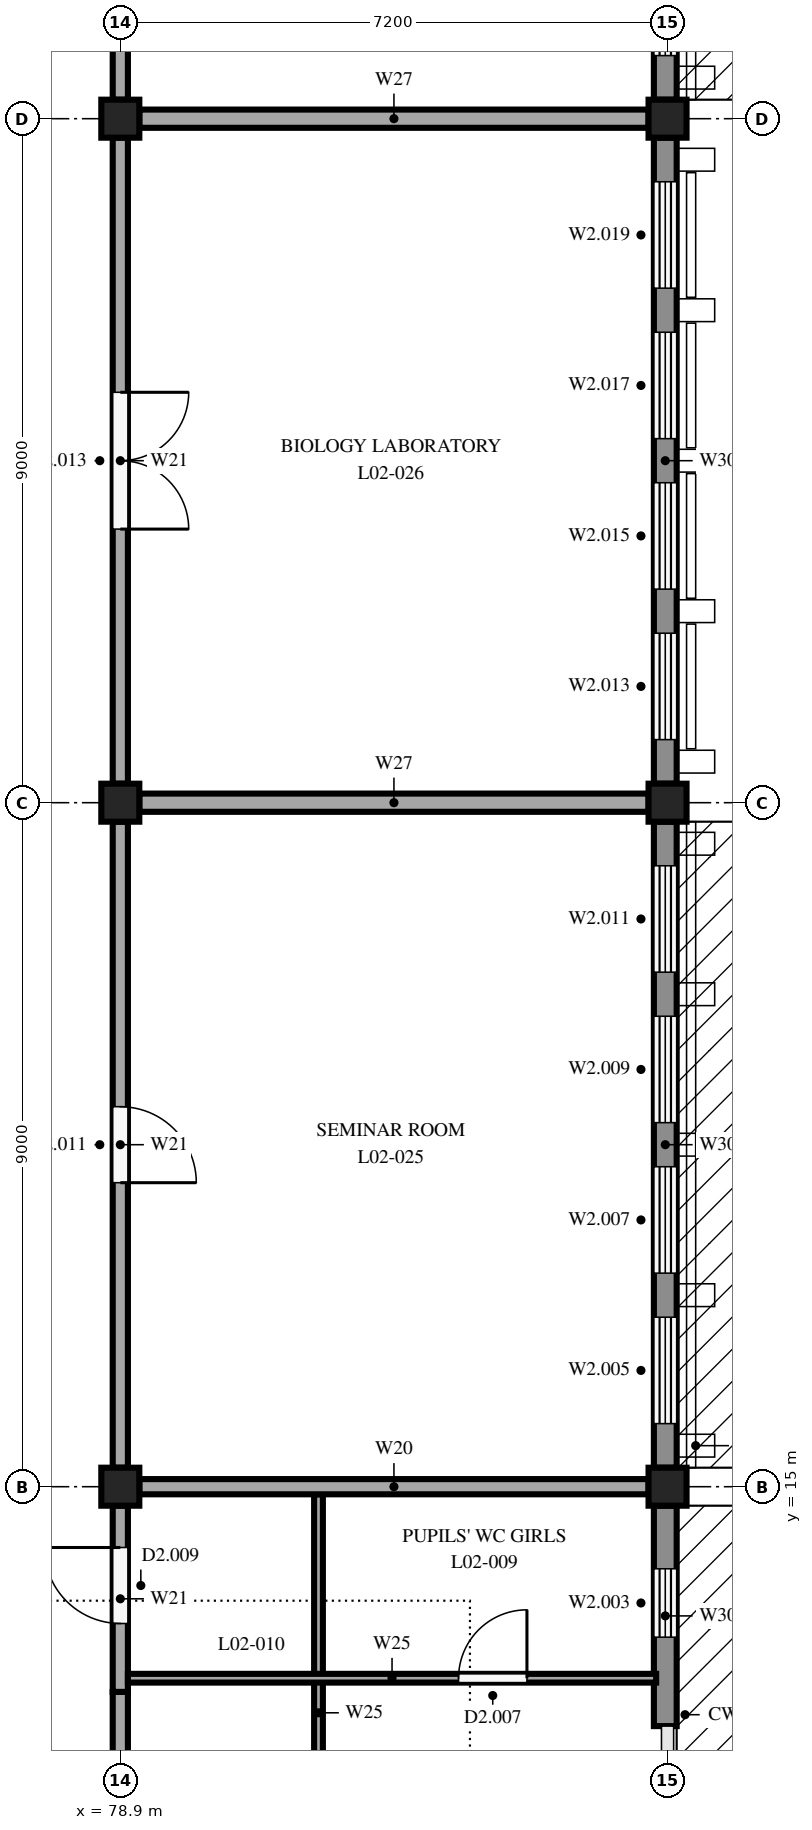
"""IFC4 building model, lengths in metres.
Left out: names, types, materials, properties, quantities, classifications, styles, units other than length and angle.
Written with IfcOpenShell. Run it as: python <this file> out.ifc"""

import sys

from ifc_helpers import new_model, si_unit, direction, frame, frame_2d, origin, origin_2d, place, context, subcontext, project, spatial, rectangle, extrude, element, fill, save


model = new_model("IFC4")
c1 = context("Model", 3, precision=1e-05, world=origin(), true_north=direction((0.0, 1.0)))
c2 = subcontext(c1, "Body", "Model", "MODEL_VIEW")
j1 = project(units=[si_unit("LENGTHUNIT", "METRE"), si_unit("PLANEANGLEUNIT", "RADIAN")], contexts=[c1])
p1 = place(None, origin())
s1 = spatial("IfcSite", under=j1, at=p1, CompositionType="ELEMENT")
p2 = place(p1, origin())
s2 = spatial("IfcBuilding", under=s1, at=p2, CompositionType="ELEMENT")
p3 = place(p2, frame((0.0, 0.0, 8.1)))
s3 = spatial("IfcBuildingStorey", under=s2, at=p3, CompositionType="ELEMENT", Elevation=8.1)
for number, where, z_axis, x_axis in (
    (1, (78.9, 15.0, 0.0), (0.0, 0.0, 1.0), (1.0, 0.0, 0.0)),
    (2, (78.9, 24.0, 0.0), (0.0, 0.0, 1.0), (1.0, 0.0, 0.0)),
    (3, (78.9, 33.0, 0.0), (0.0, 0.0, 1.0), (1.0, 0.0, 0.0)),
    (4, (86.1, 15.0, 0.0), (0.0, 0.0, 1.0), (1.0, 0.0, 0.0)),
    (5, (86.1, 24.0, 0.0), (0.0, 0.0, 1.0), (1.0, 0.0, 0.0)),
    (6, (86.1, 33.0, 0.0), (0.0, 0.0, 1.0), (1.0, 0.0, 0.0)),
):
    element("IfcColumn", number, at=place(p3, frame(where, z_axis=z_axis, x_axis=x_axis)), inside=s3, PredefinedType="COLUMN", context=c2, shape_type="SweptSolid", body=[
        extrude(rectangle(XDim=0.5, YDim=0.5, at=origin_2d()), origin(), (0.0, 0.0, 1.0), 3.35),
    ])
p4 = place(p3, frame((86.07, 14.75, 0.0), z_axis=(0.0, 0.0, 1.0), x_axis=(0.0, -1.0, 0.0)))
e7 = element("IfcWall", 7, at=p4, inside=s3, PredefinedType="STANDARD", context=c2, shape_type="SweptSolid", body=[
    extrude(rectangle(XDim=2.9, YDim=0.3, at=frame_2d((1.45, 0.0))), origin(), (0.0, 0.0, 1.0), 2.85),
])
p5 = place(p4, frame((0.83, 0.0, 1.6)))
e8 = element("IfcOpeningElement", 8, at=p5, cuts=e7, PredefinedType="OPENING", context=c2, shape_type="SweptSolid", body=[
    extrude(rectangle(XDim=0.9, YDim=1.0, at=frame_2d((0.45, 0.5))), frame((0.0, 0.16, 0.0), z_axis=(0.0, -1.0, 0.0), x_axis=(1.0, 0.0, 0.0)), (0.0, 0.0, 1.0), 0.32),
])
p6 = place(p3, frame((86.07, 23.75, 0.0), z_axis=(0.0, 0.0, 1.0), x_axis=(0.0, -1.0, 0.0)))
e9 = element("IfcWall", 9, at=p6, inside=s3, PredefinedType="STANDARD", context=c2, shape_type="SweptSolid", body=[
    extrude(rectangle(XDim=8.5, YDim=0.3, at=frame_2d((4.25, 0.0))), origin(), (0.0, 0.0, 1.0), 2.85),
])
p7 = place(p6, frame((6.52, 0.0, 0.6)))
e10 = element("IfcOpeningElement", 10, at=p7, cuts=e9, PredefinedType="OPENING", context=c2, shape_type="SweptSolid", body=[
    extrude(rectangle(XDim=1.4, YDim=2.2, at=frame_2d((0.7, 1.1))), frame((0.0, 0.16, 0.0), z_axis=(0.0, -1.0, 0.0), x_axis=(1.0, 0.0, 0.0)), (0.0, 0.0, 1.0), 0.32),
])
p8 = place(p6, frame((4.54, 0.0, 0.6)))
e11 = element("IfcOpeningElement", 11, at=p8, cuts=e9, PredefinedType="OPENING", context=c2, shape_type="SweptSolid", body=[
    extrude(rectangle(XDim=1.4, YDim=2.2, at=frame_2d((0.7, 1.1))), frame((0.0, 0.16, 0.0), z_axis=(0.0, -1.0, 0.0), x_axis=(1.0, 0.0, 0.0)), (0.0, 0.0, 1.0), 0.32),
])
p9 = place(p6, frame((2.56, 0.0, 0.6)))
e12 = element("IfcOpeningElement", 12, at=p9, cuts=e9, PredefinedType="OPENING", context=c2, shape_type="SweptSolid", body=[
    extrude(rectangle(XDim=1.4, YDim=2.2, at=frame_2d((0.7, 1.1))), frame((0.0, 0.16, 0.0), z_axis=(0.0, -1.0, 0.0), x_axis=(1.0, 0.0, 0.0)), (0.0, 0.0, 1.0), 0.32),
])
p10 = place(p6, frame((0.58, 0.0, 0.6)))
e13 = element("IfcOpeningElement", 13, at=p10, cuts=e9, PredefinedType="OPENING", context=c2, shape_type="SweptSolid", body=[
    extrude(rectangle(XDim=1.4, YDim=2.2, at=frame_2d((0.7, 1.1))), frame((0.0, 0.16, 0.0), z_axis=(0.0, -1.0, 0.0), x_axis=(1.0, 0.0, 0.0)), (0.0, 0.0, 1.0), 0.32),
])
p11 = place(p3, frame((86.07, 32.75, 0.0), z_axis=(0.0, 0.0, 1.0), x_axis=(0.0, -1.0, 0.0)))
e14 = element("IfcWall", 14, at=p11, inside=s3, PredefinedType="STANDARD", context=c2, shape_type="SweptSolid", body=[
    extrude(rectangle(XDim=8.5, YDim=0.3, at=frame_2d((4.25, 0.0))), origin(), (0.0, 0.0, 1.0), 2.85),
])
p12 = place(p11, frame((6.52, 0.0, 0.9)))
e15 = element("IfcOpeningElement", 15, at=p12, cuts=e14, PredefinedType="OPENING", context=c2, shape_type="SweptSolid", body=[
    extrude(rectangle(XDim=1.4, YDim=1.9, at=frame_2d((0.7, 0.95))), frame((0.0, 0.16, 0.0), z_axis=(0.0, -1.0, 0.0), x_axis=(1.0, 0.0, 0.0)), (0.0, 0.0, 1.0), 0.32),
])
p13 = place(p11, frame((4.54, 0.0, 0.9)))
e16 = element("IfcOpeningElement", 16, at=p13, cuts=e14, PredefinedType="OPENING", context=c2, shape_type="SweptSolid", body=[
    extrude(rectangle(XDim=1.4, YDim=1.9, at=frame_2d((0.7, 0.95))), frame((0.0, 0.16, 0.0), z_axis=(0.0, -1.0, 0.0), x_axis=(1.0, 0.0, 0.0)), (0.0, 0.0, 1.0), 0.32),
])
p14 = place(p11, frame((2.56, 0.0, 0.9)))
e17 = element("IfcOpeningElement", 17, at=p14, cuts=e14, PredefinedType="OPENING", context=c2, shape_type="SweptSolid", body=[
    extrude(rectangle(XDim=1.4, YDim=1.9, at=frame_2d((0.7, 0.95))), frame((0.0, 0.16, 0.0), z_axis=(0.0, -1.0, 0.0), x_axis=(1.0, 0.0, 0.0)), (0.0, 0.0, 1.0), 0.32),
])
p15 = place(p11, frame((0.58, 0.0, 0.9)))
e18 = element("IfcOpeningElement", 18, at=p15, cuts=e14, PredefinedType="OPENING", context=c2, shape_type="SweptSolid", body=[
    extrude(rectangle(XDim=1.4, YDim=1.9, at=frame_2d((0.7, 0.95))), frame((0.0, 0.16, 0.0), z_axis=(0.0, -1.0, 0.0), x_axis=(1.0, 0.0, 0.0)), (0.0, 0.0, 1.0), 0.32),
])
p16 = place(p3, frame((86.07, 41.75, 0.0), z_axis=(0.0, 0.0, 1.0), x_axis=(0.0, -1.0, 0.0)))
e19 = element("IfcWall", 19, at=p16, inside=s3, PredefinedType="STANDARD", context=c2, shape_type="SweptSolid", body=[
    extrude(rectangle(XDim=8.5, YDim=0.3, at=frame_2d((4.25, 0.0))), origin(), (0.0, 0.0, 1.0), 2.85),
])
p17 = place(p16, frame((6.52, 0.0, 0.9)))
e20 = element("IfcOpeningElement", 20, at=p17, cuts=e19, PredefinedType="OPENING", context=c2, shape_type="SweptSolid", body=[
    extrude(rectangle(XDim=1.4, YDim=1.9, at=frame_2d((0.7, 0.95))), frame((0.0, 0.16, 0.0), z_axis=(0.0, -1.0, 0.0), x_axis=(1.0, 0.0, 0.0)), (0.0, 0.0, 1.0), 0.32),
])
p18 = place(p16, frame((4.54, 0.0, 0.9)))
e21 = element("IfcOpeningElement", 21, at=p18, cuts=e19, PredefinedType="OPENING", context=c2, shape_type="SweptSolid", body=[
    extrude(rectangle(XDim=1.4, YDim=1.9, at=frame_2d((0.7, 0.95))), frame((0.0, 0.16, 0.0), z_axis=(0.0, -1.0, 0.0), x_axis=(1.0, 0.0, 0.0)), (0.0, 0.0, 1.0), 0.32),
])
p19 = place(p16, frame((2.56, 0.0, 0.9)))
e22 = element("IfcOpeningElement", 22, at=p19, cuts=e19, PredefinedType="OPENING", context=c2, shape_type="SweptSolid", body=[
    extrude(rectangle(XDim=1.4, YDim=1.9, at=frame_2d((0.7, 0.95))), frame((0.0, 0.16, 0.0), z_axis=(0.0, -1.0, 0.0), x_axis=(1.0, 0.0, 0.0)), (0.0, 0.0, 1.0), 0.32),
])
p20 = place(p16, frame((0.58, 0.0, 0.9)))
e23 = element("IfcOpeningElement", 23, at=p20, cuts=e19, PredefinedType="OPENING", context=c2, shape_type="SweptSolid", body=[
    extrude(rectangle(XDim=1.4, YDim=1.9, at=frame_2d((0.7, 0.95))), frame((0.0, 0.16, 0.0), z_axis=(0.0, -1.0, 0.0), x_axis=(1.0, 0.0, 0.0)), (0.0, 0.0, 1.0), 0.32),
])
p21 = place(p3, frame((78.9, 12.3, 0.0), z_axis=(0.0, 0.0, 1.0), x_axis=(0.0, -1.0, 0.0)))
e24 = element("IfcWall", 24, at=p21, inside=s3, PredefinedType="PARTITIONING", context=c2, shape_type="SweptSolid", body=[
    extrude(rectangle(XDim=3.15, YDim=0.2, at=frame_2d((1.575, 0.0))), origin(), (0.0, 0.0, 1.0), 2.9),
])
p22 = place(p21, frame((0.9, 0.0, 0.0)))
e25 = element("IfcOpeningElement", 25, at=p22, cuts=e24, PredefinedType="OPENING", context=c2, shape_type="SweptSolid", body=[
    extrude(rectangle(XDim=1.2, YDim=2.1, at=frame_2d((0.6, 1.05))), frame((0.0, 0.11, 0.0), z_axis=(0.0, -1.0, 0.0), x_axis=(1.0, 0.0, 0.0)), (0.0, 0.0, 1.0), 0.22),
])
p23 = place(p3, frame((78.9, 12.3, 0.0), z_axis=(0.0, 0.0, 1.0), x_axis=(0.0, 1.0, 0.0)))
e26 = element("IfcWall", 26, at=p23, inside=s3, PredefinedType="PARTITIONING", context=c2, shape_type="SweptSolid", body=[
    extrude(rectangle(XDim=2.45, YDim=0.2, at=frame_2d((1.225, 0.0))), origin(), (0.0, 0.0, 1.0), 2.9),
])
p24 = place(p23, frame((0.9, 0.0, 0.0)))
e27 = element("IfcOpeningElement", 27, at=p24, cuts=e26, PredefinedType="OPENING", context=c2, shape_type="SweptSolid", body=[
    extrude(rectangle(XDim=1.0, YDim=2.1, at=frame_2d((0.5, 1.05))), frame((0.0, 0.11, 0.0), z_axis=(0.0, -1.0, 0.0), x_axis=(1.0, 0.0, 0.0)), (0.0, 0.0, 1.0), 0.22),
])
p25 = place(p3, frame((79.15, 15.0, 0.0), z_axis=(0.0, 0.0, 1.0), x_axis=(1.0, 0.0, 0.0)))
e28 = element("IfcWall", 28, at=p25, inside=s3, PredefinedType="PARTITIONING", context=c2, shape_type="SweptSolid", body=[
    extrude(rectangle(XDim=6.7, YDim=0.2, at=frame_2d((3.35, 0.0))), origin(), (0.0, 0.0, 1.0), 2.9),
])
p26 = place(p3, frame((81.508, 14.9, 0.0), z_axis=(0.0, 0.0, 1.0), x_axis=(0.0, -1.0, 0.0)))
e29 = element("IfcWall", 29, at=p26, inside=s3, PredefinedType="PARTITIONING", context=c2, shape_type="SweptSolid", body=[
    extrude(rectangle(XDim=5.75, YDim=0.115, at=frame_2d((2.875, 0.0))), origin(), (0.0, 0.0, 1.0), 3.35),
])
p27 = place(p26, frame((3.65, 0.0, 0.0)))
e30 = element("IfcOpeningElement", 30, at=p27, cuts=e29, PredefinedType="OPENING", context=c2, shape_type="SweptSolid", body=[
    extrude(rectangle(XDim=0.9, YDim=2.1, at=frame_2d((0.45, 1.05))), frame((0.0, 0.067, 0.0), z_axis=(0.0, -1.0, 0.0), x_axis=(1.0, 0.0, 0.0)), (0.0, 0.0, 1.0), 0.135),
])
p28 = place(p3, frame((79.0, 12.48, 0.0), z_axis=(0.0, 0.0, 1.0), x_axis=(1.0, 0.0, 0.0)))
e31 = element("IfcWall", 31, at=p28, inside=s3, PredefinedType="PARTITIONING", context=c2, shape_type="SweptSolid", body=[
    extrude(rectangle(XDim=6.95, YDim=0.115, at=frame_2d((3.475, 0.0))), origin(), (0.0, 0.0, 1.0), 3.35),
])
p29 = place(p28, frame((4.35, 0.0, 0.0)))
e32 = element("IfcOpeningElement", 32, at=p29, cuts=e31, PredefinedType="OPENING", context=c2, shape_type="SweptSolid", body=[
    extrude(rectangle(XDim=0.9, YDim=2.1, at=frame_2d((0.45, 1.05))), frame((0.0, 0.067, 0.0), z_axis=(0.0, -1.0, 0.0), x_axis=(1.0, 0.0, 0.0)), (0.0, 0.0, 1.0), 0.135),
])
p30 = place(p3, frame((78.9, 23.75, 0.0), z_axis=(0.0, 0.0, 1.0), x_axis=(0.0, -1.0, 0.0)))
e33 = element("IfcWall", 33, at=p30, inside=s3, PredefinedType="PARTITIONING", context=c2, shape_type="SweptSolid", body=[
    extrude(rectangle(XDim=8.5, YDim=0.2, at=frame_2d((4.25, 0.0))), origin(), (0.0, 0.0, 1.0), 2.9),
])
p31 = place(p30, frame((3.75, 0.0, 0.0)))
e34 = element("IfcOpeningElement", 34, at=p31, cuts=e33, PredefinedType="OPENING", context=c2, shape_type="SweptSolid", body=[
    extrude(rectangle(XDim=1.0, YDim=2.1, at=frame_2d((0.5, 1.05))), frame((0.0, 0.11, 0.0), z_axis=(0.0, -1.0, 0.0), x_axis=(1.0, 0.0, 0.0)), (0.0, 0.0, 1.0), 0.22),
])
p32 = place(p3, frame((78.9, 32.75, 0.0), z_axis=(0.0, 0.0, 1.0), x_axis=(0.0, -1.0, 0.0)))
e35 = element("IfcWall", 35, at=p32, inside=s3, PredefinedType="PARTITIONING", context=c2, shape_type="SweptSolid", body=[
    extrude(rectangle(XDim=8.5, YDim=0.2, at=frame_2d((4.25, 0.0))), origin(), (0.0, 0.0, 1.0), 2.9),
])
p33 = place(p32, frame((3.35, 0.0, 0.0)))
e36 = element("IfcOpeningElement", 36, at=p33, cuts=e35, PredefinedType="OPENING", context=c2, shape_type="SweptSolid", body=[
    extrude(rectangle(XDim=1.8, YDim=2.1, at=frame_2d((0.9, 1.05))), frame((0.0, 0.11, 0.0), z_axis=(0.0, -1.0, 0.0), x_axis=(1.0, 0.0, 0.0)), (0.0, 0.0, 1.0), 0.22),
])
p34 = place(p3, frame((78.9, 41.75, 0.0), z_axis=(0.0, 0.0, 1.0), x_axis=(0.0, -1.0, 0.0)))
e37 = element("IfcWall", 37, at=p34, inside=s3, PredefinedType="PARTITIONING", context=c2, shape_type="SweptSolid", body=[
    extrude(rectangle(XDim=8.5, YDim=0.2, at=frame_2d((4.25, 0.0))), origin(), (0.0, 0.0, 1.0), 2.9),
])
p35 = place(p34, frame((5.985, 0.0, 0.0)))
e38 = element("IfcOpeningElement", 38, at=p35, cuts=e37, PredefinedType="OPENING", context=c2, shape_type="SweptSolid", body=[
    extrude(rectangle(XDim=0.9, YDim=2.1, at=frame_2d((0.45, 1.05))), frame((0.0, 0.11, 0.0), z_axis=(0.0, -1.0, 0.0), x_axis=(1.0, 0.0, 0.0)), (0.0, 0.0, 1.0), 0.22),
])
p36 = place(p34, frame((1.165, 0.0, 0.0)))
e39 = element("IfcOpeningElement", 39, at=p36, cuts=e37, PredefinedType="OPENING", context=c2, shape_type="SweptSolid", body=[
    extrude(rectangle(XDim=1.8, YDim=2.1, at=frame_2d((0.9, 1.05))), frame((0.0, 0.11, 0.0), z_axis=(0.0, -1.0, 0.0), x_axis=(1.0, 0.0, 0.0)), (0.0, 0.0, 1.0), 0.22),
])
for number, where, z_axis, x_axis in (
    (40, (79.15, 24.0, 0.0), (0.0, 0.0, 1.0), (1.0, 0.0, 0.0)),
    (41, (79.15, 33.0, 0.0), (0.0, 0.0, 1.0), (1.0, 0.0, 0.0)),
):
    element("IfcWall", number, at=place(p3, frame(where, z_axis=z_axis, x_axis=x_axis)), inside=s3, PredefinedType="PARTITIONING", context=c2, shape_type="SweptSolid", body=[
        extrude(rectangle(XDim=6.7, YDim=0.24, at=frame_2d((3.35, 0.0))), origin(), (0.0, 0.0, 1.0), 2.9),
    ])
p37 = place(p5, origin())
e42 = element("IfcWindow", 42, at=p37, inside=s3, PartitioningType="SINGLE_PANEL", PredefinedType="WINDOW", context=c2, shape_type="SweptSolid", body=[
    extrude(rectangle(XDim=0.9, YDim=1.0, at=frame_2d((0.45, 0.5))), frame((0.0, 0.03, 0.0), z_axis=(0.0, -1.0, 0.0), x_axis=(1.0, 0.0, 0.0)), (0.0, 0.0, 1.0), 0.06),
])
fill(e8, e42)
p38 = place(p7, origin())
e43 = element("IfcWindow", 43, at=p38, inside=s3, PartitioningType="DOUBLE_PANEL_VERTICAL", PredefinedType="WINDOW", context=c2, shape_type="SweptSolid", body=[
    extrude(rectangle(XDim=1.4, YDim=2.2, at=frame_2d((0.7, 1.1))), frame((0.0, 0.03, 0.0), z_axis=(0.0, -1.0, 0.0), x_axis=(1.0, 0.0, 0.0)), (0.0, 0.0, 1.0), 0.06),
])
fill(e10, e43)
p39 = place(p8, origin())
e44 = element("IfcWindow", 44, at=p39, inside=s3, PartitioningType="DOUBLE_PANEL_VERTICAL", PredefinedType="WINDOW", context=c2, shape_type="SweptSolid", body=[
    extrude(rectangle(XDim=1.4, YDim=2.2, at=frame_2d((0.7, 1.1))), frame((0.0, 0.03, 0.0), z_axis=(0.0, -1.0, 0.0), x_axis=(1.0, 0.0, 0.0)), (0.0, 0.0, 1.0), 0.06),
])
fill(e11, e44)
p40 = place(p9, origin())
e45 = element("IfcWindow", 45, at=p40, inside=s3, PartitioningType="DOUBLE_PANEL_VERTICAL", PredefinedType="WINDOW", context=c2, shape_type="SweptSolid", body=[
    extrude(rectangle(XDim=1.4, YDim=2.2, at=frame_2d((0.7, 1.1))), frame((0.0, 0.03, 0.0), z_axis=(0.0, -1.0, 0.0), x_axis=(1.0, 0.0, 0.0)), (0.0, 0.0, 1.0), 0.06),
])
fill(e12, e45)
p41 = place(p10, origin())
e46 = element("IfcWindow", 46, at=p41, inside=s3, PartitioningType="DOUBLE_PANEL_VERTICAL", PredefinedType="WINDOW", context=c2, shape_type="SweptSolid", body=[
    extrude(rectangle(XDim=1.4, YDim=2.2, at=frame_2d((0.7, 1.1))), frame((0.0, 0.03, 0.0), z_axis=(0.0, -1.0, 0.0), x_axis=(1.0, 0.0, 0.0)), (0.0, 0.0, 1.0), 0.06),
])
fill(e13, e46)
p42 = place(p12, origin())
e47 = element("IfcWindow", 47, at=p42, inside=s3, PartitioningType="DOUBLE_PANEL_VERTICAL", PredefinedType="WINDOW", context=c2, shape_type="SweptSolid", body=[
    extrude(rectangle(XDim=1.4, YDim=1.9, at=frame_2d((0.7, 0.95))), frame((0.0, 0.03, 0.0), z_axis=(0.0, -1.0, 0.0), x_axis=(1.0, 0.0, 0.0)), (0.0, 0.0, 1.0), 0.06),
])
fill(e15, e47)
p43 = place(p13, origin())
e48 = element("IfcWindow", 48, at=p43, inside=s3, PartitioningType="DOUBLE_PANEL_VERTICAL", PredefinedType="WINDOW", context=c2, shape_type="SweptSolid", body=[
    extrude(rectangle(XDim=1.4, YDim=1.9, at=frame_2d((0.7, 0.95))), frame((0.0, 0.03, 0.0), z_axis=(0.0, -1.0, 0.0), x_axis=(1.0, 0.0, 0.0)), (0.0, 0.0, 1.0), 0.06),
])
fill(e16, e48)
p44 = place(p14, origin())
e49 = element("IfcWindow", 49, at=p44, inside=s3, PartitioningType="DOUBLE_PANEL_VERTICAL", PredefinedType="WINDOW", context=c2, shape_type="SweptSolid", body=[
    extrude(rectangle(XDim=1.4, YDim=1.9, at=frame_2d((0.7, 0.95))), frame((0.0, 0.03, 0.0), z_axis=(0.0, -1.0, 0.0), x_axis=(1.0, 0.0, 0.0)), (0.0, 0.0, 1.0), 0.06),
])
fill(e17, e49)
p45 = place(p15, origin())
e50 = element("IfcWindow", 50, at=p45, inside=s3, PartitioningType="DOUBLE_PANEL_VERTICAL", PredefinedType="WINDOW", context=c2, shape_type="SweptSolid", body=[
    extrude(rectangle(XDim=1.4, YDim=1.9, at=frame_2d((0.7, 0.95))), frame((0.0, 0.03, 0.0), z_axis=(0.0, -1.0, 0.0), x_axis=(1.0, 0.0, 0.0)), (0.0, 0.0, 1.0), 0.06),
])
fill(e18, e50)
p46 = place(p17, origin())
e51 = element("IfcWindow", 51, at=p46, inside=s3, PartitioningType="DOUBLE_PANEL_VERTICAL", PredefinedType="WINDOW", context=c2, shape_type="SweptSolid", body=[
    extrude(rectangle(XDim=1.4, YDim=1.9, at=frame_2d((0.7, 0.95))), frame((0.0, 0.03, 0.0), z_axis=(0.0, -1.0, 0.0), x_axis=(1.0, 0.0, 0.0)), (0.0, 0.0, 1.0), 0.06),
])
fill(e20, e51)
p47 = place(p24, origin())
e52 = element("IfcDoor", 52, at=p47, inside=s3, OperationType="SINGLE_SWING_RIGHT", PredefinedType="DOOR", context=c2, shape_type="SweptSolid", body=[
    extrude(rectangle(XDim=1.0, YDim=2.1, at=frame_2d((0.5, 1.05))), frame((0.0, 0.025, 0.0), z_axis=(0.0, -1.0, 0.0), x_axis=(1.0, 0.0, 0.0)), (0.0, 0.0, 1.0), 0.05),
])
fill(e27, e52)
p48 = place(p29, origin())
e53 = element("IfcDoor", 53, at=p48, inside=s3, OperationType="SINGLE_SWING_RIGHT", PredefinedType="DOOR", context=c2, shape_type="SweptSolid", body=[
    extrude(rectangle(XDim=0.9, YDim=2.1, at=frame_2d((0.45, 1.05))), frame((0.0, 0.025, 0.0), z_axis=(0.0, -1.0, 0.0), x_axis=(1.0, 0.0, 0.0)), (0.0, 0.0, 1.0), 0.05),
])
fill(e32, e53)
p49 = place(p31, origin())
e54 = element("IfcDoor", 54, at=p49, inside=s3, OperationType="SINGLE_SWING_RIGHT", PredefinedType="DOOR", context=c2, shape_type="SweptSolid", body=[
    extrude(rectangle(XDim=1.0, YDim=2.1, at=frame_2d((0.5, 1.05))), frame((0.0, 0.025, 0.0), z_axis=(0.0, -1.0, 0.0), x_axis=(1.0, 0.0, 0.0)), (0.0, 0.0, 1.0), 0.05),
])
fill(e34, e54)
p50 = place(p33, origin())
e55 = element("IfcDoor", 55, at=p50, inside=s3, OperationType="DOUBLE_DOOR_DOUBLE_SWING", PredefinedType="DOOR", context=c2, shape_type="SweptSolid", body=[
    extrude(rectangle(XDim=1.8, YDim=2.1, at=frame_2d((0.9, 1.05))), frame((0.0, 0.025, 0.0), z_axis=(0.0, -1.0, 0.0), x_axis=(1.0, 0.0, 0.0)), (0.0, 0.0, 1.0), 0.05),
])
fill(e36, e55)
save(model, sys.argv[1])
